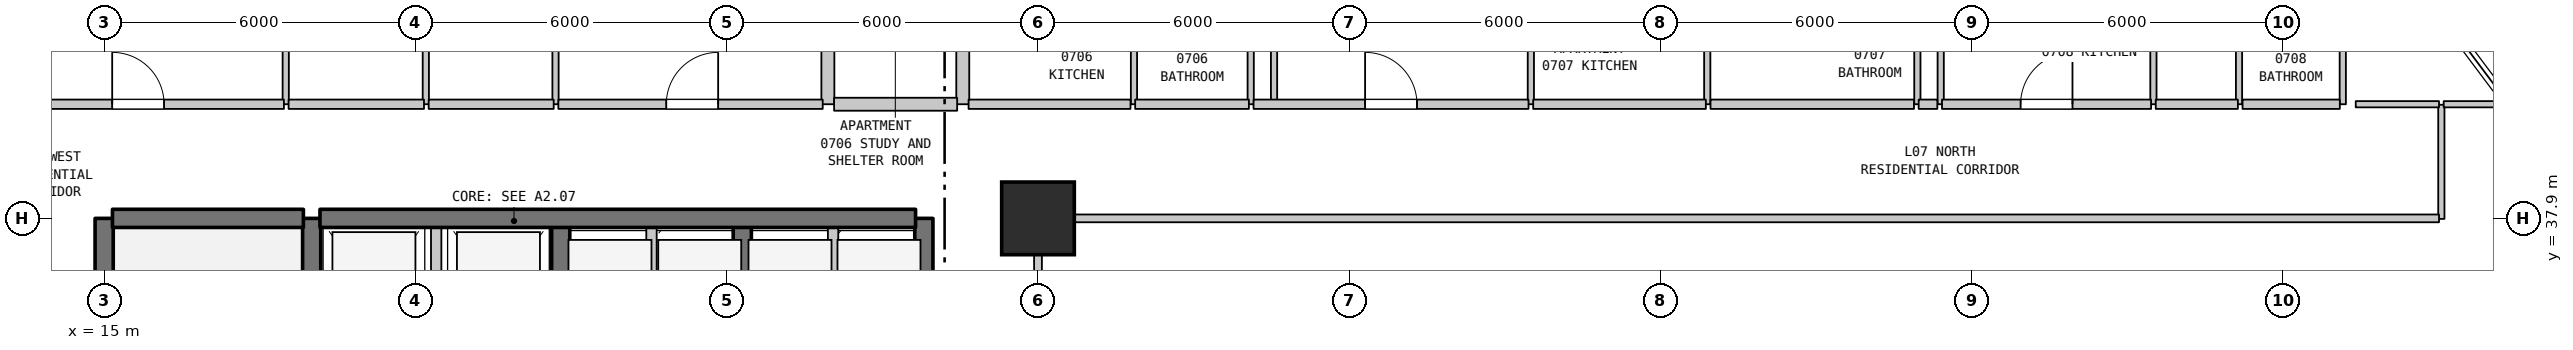
"""IFC4 building model, lengths in metres.
Left out: names, types, materials, properties, quantities, classifications, styles, units other than length and angle.
Written with IfcOpenShell. Run it as: python <this file> out.ifc"""

import sys

from ifc_helpers import new_model, si_unit, direction, frame, frame_2d, origin, origin_2d, place, context, subcontext, project, spatial, rectangle, extrude, element, fill, save


model = new_model("IFC4")
c1 = context("Model", 3, precision=1e-05, world=origin(), true_north=direction((0.0, 1.0)))
c2 = subcontext(c1, "Body", "Model", "MODEL_VIEW")
j1 = project(units=[si_unit("LENGTHUNIT", "METRE"), si_unit("PLANEANGLEUNIT", "RADIAN")], contexts=[c1])
p1 = place(None, origin())
s1 = spatial("IfcSite", under=j1, at=p1, CompositionType="ELEMENT")
p2 = place(p1, origin())
s2 = spatial("IfcBuilding", under=s1, at=p2, CompositionType="ELEMENT")
p3 = place(p2, frame((0.0, 0.0, 35.1)))
s3 = spatial("IfcBuildingStorey", under=s2, at=p3, CompositionType="ELEMENT", Elevation=35.1)
p4 = place(p3, frame((33.0, 37.9, 0.0), z_axis=(0.0, 0.0, 1.0), x_axis=(1.0, 0.0, 0.0)))
e1 = element("IfcColumn", 1, at=p4, inside=s3, PredefinedType="COLUMN", context=c2, shape_type="SweptSolid", body=[
    extrude(rectangle(XDim=1.4, YDim=1.4, at=origin_2d()), origin(), (0.0, 0.0, 1.0), 3.7),
])
p5 = place(p3, frame((15.0, 31.1, 0.0), z_axis=(0.0, 0.0, 1.0), x_axis=(0.0, 1.0, 0.0)))
e2 = element("IfcWall", 2, at=p5, inside=s3, PredefinedType="SHEAR", context=c2, shape_type="SweptSolid", body=[
    extrude(rectangle(XDim=6.8, YDim=0.35, at=frame_2d((3.4, 0.0))), origin(), (0.0, 0.0, 1.0), 3.385),
])
p6 = place(p3, frame((18.5, 40.1, 0.0), z_axis=(0.0, 0.0, 1.0), x_axis=(0.0, 1.0, 0.0)))
e3 = element("IfcWall", 3, at=p6, inside=s3, PredefinedType="PARTITIONING", context=c2, shape_type="SweptSolid", body=[
    extrude(rectangle(XDim=3.2, YDim=0.12, at=frame_2d((1.6, 0.0))), origin(), (0.0, 0.0, 1.0), 3.385),
])
p7 = place(p3, frame((19.0, 35.0, 0.0), z_axis=(0.0, 0.0, 1.0), x_axis=(0.0, 1.0, 0.0)))
e4 = element("IfcWall", 4, at=p7, inside=s3, PredefinedType="SHEAR", context=c2, shape_type="SweptSolid", body=[
    extrude(rectangle(XDim=2.9, YDim=0.35, at=frame_2d((1.45, 0.0))), origin(), (0.0, 0.0, 1.0), 3.385),
])
p8 = place(p3, frame((21.2, 40.1, 0.0), z_axis=(0.0, 0.0, 1.0), x_axis=(0.0, 1.0, 0.0)))
e5 = element("IfcWall", 5, at=p8, inside=s3, PredefinedType="PARTITIONING", context=c2, shape_type="SweptSolid", body=[
    extrude(rectangle(XDim=3.2, YDim=0.12, at=frame_2d((1.6, 0.0))), origin(), (0.0, 0.0, 1.0), 3.385),
])
p9 = place(p8, frame((1.15, 0.0, 0.0)))
e6 = element("IfcOpeningElement", 6, at=p9, cuts=e5, PredefinedType="OPENING", context=c2, shape_type="SweptSolid", body=[
    extrude(rectangle(XDim=0.9, YDim=2.15, at=frame_2d((0.45, 1.075))), frame((0.0, 0.07, 0.0), z_axis=(0.0, -1.0, 0.0), x_axis=(1.0, 0.0, 0.0)), (0.0, 0.0, 1.0), 0.14),
])
p10 = place(p3, frame((21.4, 35.0, 0.0), z_axis=(0.0, 0.0, 1.0), x_axis=(0.0, 1.0, 0.0)))
e7 = element("IfcWall", 7, at=p10, inside=s3, PredefinedType="STANDARD", context=c2, shape_type="SweptSolid", body=[
    extrude(rectangle(XDim=2.9, YDim=0.2, at=frame_2d((1.45, 0.0))), origin(), (0.0, 0.0, 1.0), 3.385),
])
p11 = place(p3, frame((23.7, 40.1, 0.0), z_axis=(0.0, 0.0, 1.0), x_axis=(0.0, 1.0, 0.0)))
e8 = element("IfcWall", 8, at=p11, inside=s3, PredefinedType="PARTITIONING", context=c2, shape_type="SweptSolid", body=[
    extrude(rectangle(XDim=2.05, YDim=0.12, at=frame_2d((1.025, 0.0))), origin(), (0.0, 0.0, 1.0), 3.385),
])
p12 = place(p3, frame((23.8, 35.0, 0.0), z_axis=(0.0, 0.0, 1.0), x_axis=(0.0, 1.0, 0.0)))
e9 = element("IfcWall", 9, at=p12, inside=s3, PredefinedType="SHEAR", context=c2, shape_type="SweptSolid", body=[
    extrude(rectangle(XDim=2.9, YDim=0.35, at=frame_2d((1.45, 0.0))), origin(), (0.0, 0.0, 1.0), 3.385),
])
p13 = place(p3, frame((25.55, 35.0, 0.0), z_axis=(0.0, 0.0, 1.0), x_axis=(0.0, 1.0, 0.0)))
e10 = element("IfcWall", 10, at=p13, inside=s3, PredefinedType="STANDARD", context=c2, shape_type="SweptSolid", body=[
    extrude(rectangle(XDim=2.9, YDim=0.2, at=frame_2d((1.45, 0.0))), origin(), (0.0, 0.0, 1.0), 3.385),
])
p14 = place(p3, frame((27.3, 35.0, 0.0), z_axis=(0.0, 0.0, 1.0), x_axis=(0.0, 1.0, 0.0)))
e11 = element("IfcWall", 11, at=p14, inside=s3, PredefinedType="SHEAR", context=c2, shape_type="SweptSolid", body=[
    extrude(rectangle(XDim=2.9, YDim=0.35, at=frame_2d((1.45, 0.0))), origin(), (0.0, 0.0, 1.0), 3.385),
])
p15 = place(p3, frame((28.95, 40.1, 0.0), z_axis=(0.0, 0.0, 1.0), x_axis=(0.0, 1.0, 0.0)))
e12 = element("IfcWall", 12, at=p15, inside=s3, PredefinedType="STANDARD", context=c2, shape_type="SweptSolid", body=[
    extrude(rectangle(XDim=2.3, YDim=0.25, at=frame_2d((1.15, 0.0))), origin(), (0.0, 0.0, 1.0), 3.385),
])
p16 = place(p3, frame((29.05, 35.0, 0.0), z_axis=(0.0, 0.0, 1.0), x_axis=(0.0, 1.0, 0.0)))
e13 = element("IfcWall", 13, at=p16, inside=s3, PredefinedType="STANDARD", context=c2, shape_type="SweptSolid", body=[
    extrude(rectangle(XDim=2.9, YDim=0.2, at=frame_2d((1.45, 0.0))), origin(), (0.0, 0.0, 1.0), 3.385),
])
p17 = place(p3, frame((30.8, 35.0, 0.0), z_axis=(0.0, 0.0, 1.0), x_axis=(0.0, 1.0, 0.0)))
e14 = element("IfcWall", 14, at=p17, inside=s3, PredefinedType="SHEAR", context=c2, shape_type="SweptSolid", body=[
    extrude(rectangle(XDim=2.9, YDim=0.35, at=frame_2d((1.45, 0.0))), origin(), (0.0, 0.0, 1.0), 3.385),
])
p18 = place(p3, frame((31.55, 40.1, 0.0), z_axis=(0.0, 0.0, 1.0), x_axis=(0.0, 1.0, 0.0)))
e15 = element("IfcWall", 15, at=p18, inside=s3, PredefinedType="STANDARD", context=c2, shape_type="SweptSolid", body=[
    extrude(rectangle(XDim=2.3, YDim=0.25, at=frame_2d((1.15, 0.0))), origin(), (0.0, 0.0, 1.0), 3.385),
])
p19 = place(p3, frame((33.0, 27.91, 0.0), z_axis=(0.0, 0.0, 1.0), x_axis=(0.0, 1.0, 0.0)))
e16 = element("IfcWall", 16, at=p19, inside=s3, PredefinedType="STANDARD", context=c2, shape_type="SweptSolid", body=[
    extrude(rectangle(XDim=9.98, YDim=0.15, at=frame_2d((4.99, 0.0))), origin(), (0.0, 0.0, 1.0), 2.885),
])
for number, where, z_axis, x_axis in (
    (17, (34.85, 40.1, 0.0), (0.0, 0.0, 1.0), (0.0, 1.0, 0.0)),
    (18, (37.1, 40.1, 0.0), (0.0, 0.0, 1.0), (0.0, 1.0, 0.0)),
):
    element("IfcWall", number, at=place(p3, frame(where, z_axis=z_axis, x_axis=x_axis)), inside=s3, PredefinedType="PARTITIONING", context=c2, shape_type="SweptSolid", body=[
        extrude(rectangle(XDim=2.3, YDim=0.12, at=frame_2d((1.15, 0.0))), origin(), (0.0, 0.0, 1.0), 3.385),
    ])
p20 = place(p3, frame((37.55, 40.1, 0.0), z_axis=(0.0, 0.0, 1.0), x_axis=(0.0, 1.0, 0.0)))
e19 = element("IfcWall", 19, at=p20, inside=s3, PredefinedType="PARTITIONING", context=c2, shape_type="SweptSolid", body=[
    extrude(rectangle(XDim=2.05, YDim=0.12, at=frame_2d((1.025, 0.0))), origin(), (0.0, 0.0, 1.0), 3.385),
])
for number, where, z_axis, x_axis in (
    (20, (42.5, 40.1, 0.0), (0.0, 0.0, 1.0), (0.0, 1.0, 0.0)),
    (21, (45.9, 40.1, 0.0), (0.0, 0.0, 1.0), (0.0, 1.0, 0.0)),
    (22, (49.95, 40.1, 0.0), (0.0, 0.0, 1.0), (0.0, 1.0, 0.0)),
):
    element("IfcWall", number, at=place(p3, frame(where, z_axis=z_axis, x_axis=x_axis)), inside=s3, PredefinedType="PARTITIONING", context=c2, shape_type="SweptSolid", body=[
        extrude(rectangle(XDim=2.3, YDim=0.12, at=frame_2d((1.15, 0.0))), origin(), (0.0, 0.0, 1.0), 3.385),
    ])
p21 = place(p3, frame((50.4, 40.1, 0.0), z_axis=(0.0, 0.0, 1.0), x_axis=(0.0, 1.0, 0.0)))
e23 = element("IfcWall", 23, at=p21, inside=s3, PredefinedType="PARTITIONING", context=c2, shape_type="SweptSolid", body=[
    extrude(rectangle(XDim=5.35, YDim=0.12, at=frame_2d((2.675, 0.0))), origin(), (0.0, 0.0, 1.0), 3.385),
])
for number, where, z_axis, x_axis in (
    (24, (54.5, 40.1, 0.0), (0.0, 0.0, 1.0), (0.0, 1.0, 0.0)),
    (25, (56.15, 40.1, 0.0), (0.0, 0.0, 1.0), (0.0, 1.0, 0.0)),
    (26, (58.15, 40.1, 0.0), (0.0, 0.0, 1.0), (0.0, 1.0, 0.0)),
):
    element("IfcWall", number, at=place(p3, frame(where, z_axis=z_axis, x_axis=x_axis)), inside=s3, PredefinedType="PARTITIONING", context=c2, shape_type="SweptSolid", body=[
        extrude(rectangle(XDim=2.3, YDim=0.12, at=frame_2d((1.15, 0.0))), origin(), (0.0, 0.0, 1.0), 3.385),
    ])
p22 = place(p3, frame((60.05, 37.89, 0.0), z_axis=(0.0, 0.0, 1.0), x_axis=(0.0, 1.0, 0.0)))
e27 = element("IfcWall", 27, at=p22, inside=s3, PredefinedType="PARTITIONING", context=c2, shape_type="SweptSolid", body=[
    extrude(rectangle(XDim=2.2, YDim=0.12, at=frame_2d((1.1, 0.0))), origin(), (0.0, 0.0, 1.0), 3.385),
])
p23 = place(p3, frame((15.16, 37.9, 0.0), z_axis=(0.0, 0.0, 1.0), x_axis=(1.0, 0.0, 0.0)))
e28 = element("IfcWall", 28, at=p23, inside=s3, PredefinedType="SHEAR", context=c2, shape_type="SweptSolid", body=[
    extrude(rectangle(XDim=3.68, YDim=0.35, at=frame_2d((1.84, 0.0))), origin(), (0.0, 0.0, 1.0), 3.385),
])
p24 = place(p3, frame((19.16, 37.9, 0.0), z_axis=(0.0, 0.0, 1.0), x_axis=(1.0, 0.0, 0.0)))
e29 = element("IfcWall", 29, at=p24, inside=s3, PredefinedType="SHEAR", context=c2, shape_type="SweptSolid", body=[
    extrude(rectangle(XDim=11.48, YDim=0.35, at=frame_2d((5.74, 0.0))), origin(), (0.0, 0.0, 1.0), 3.385),
])
p25 = place(p3, frame((33.07, 37.9, 0.0), z_axis=(0.0, 0.0, 1.0), x_axis=(1.0, 0.0, 0.0)))
e30 = element("IfcWall", 30, at=p25, inside=s3, PredefinedType="STANDARD", context=c2, shape_type="SweptSolid", body=[
    extrude(rectangle(XDim=26.935, YDim=0.15, at=frame_2d((13.467, 0.0))), origin(), (0.0, 0.0, 1.0), 3.385),
])
p26 = place(p3, frame((12.875, 40.1, 0.0), z_axis=(0.0, 0.0, 1.0), x_axis=(1.0, 0.0, 0.0)))
e31 = element("IfcWall", 31, at=p26, inside=s3, PredefinedType="STANDARD", context=c2, shape_type="SweptSolid", body=[
    extrude(rectangle(XDim=5.59, YDim=0.18, at=frame_2d((2.795, 0.0))), origin(), (0.0, 0.0, 1.0), 3.385),
])
p27 = place(p26, frame((2.28, 0.0, 0.0)))
e32 = element("IfcOpeningElement", 32, at=p27, cuts=e31, PredefinedType="OPENING", context=c2, shape_type="SweptSolid", body=[
    extrude(rectangle(XDim=1.0, YDim=2.15, at=frame_2d((0.5, 1.075))), frame((0.0, 0.1, 0.0), z_axis=(0.0, -1.0, 0.0), x_axis=(1.0, 0.0, 0.0)), (0.0, 0.0, 1.0), 0.2),
])
p28 = place(p3, frame((18.555, 40.1, 0.0), z_axis=(0.0, 0.0, 1.0), x_axis=(1.0, 0.0, 0.0)))
e33 = element("IfcWall", 33, at=p28, inside=s3, PredefinedType="STANDARD", context=c2, shape_type="SweptSolid", body=[
    extrude(rectangle(XDim=2.61, YDim=0.18, at=frame_2d((1.305, 0.0))), origin(), (0.0, 0.0, 1.0), 3.385),
])
p29 = place(p3, frame((21.255, 40.1, 0.0), z_axis=(0.0, 0.0, 1.0), x_axis=(1.0, 0.0, 0.0)))
e34 = element("IfcWall", 34, at=p29, inside=s3, PredefinedType="STANDARD", context=c2, shape_type="SweptSolid", body=[
    extrude(rectangle(XDim=2.41, YDim=0.18, at=frame_2d((1.205, 0.0))), origin(), (0.0, 0.0, 1.0), 3.385),
])
p30 = place(p3, frame((23.755, 40.1, 0.0), z_axis=(0.0, 0.0, 1.0), x_axis=(1.0, 0.0, 0.0)))
e35 = element("IfcWall", 35, at=p30, inside=s3, PredefinedType="STANDARD", context=c2, shape_type="SweptSolid", body=[
    extrude(rectangle(XDim=5.095, YDim=0.18, at=frame_2d((2.548, 0.0))), origin(), (0.0, 0.0, 1.0), 3.385),
])
p31 = place(p30, frame((2.08, 0.0, 0.0)))
e36 = element("IfcOpeningElement", 36, at=p31, cuts=e35, PredefinedType="OPENING", context=c2, shape_type="SweptSolid", body=[
    extrude(rectangle(XDim=1.0, YDim=2.15, at=frame_2d((0.5, 1.075))), frame((0.0, 0.1, 0.0), z_axis=(0.0, -1.0, 0.0), x_axis=(1.0, 0.0, 0.0)), (0.0, 0.0, 1.0), 0.2),
])
p32 = place(p3, frame((29.07, 40.1, 0.0), z_axis=(0.0, 0.0, 1.0), x_axis=(1.0, 0.0, 0.0)))
e37 = element("IfcWall", 37, at=p32, inside=s3, PredefinedType="STANDARD", context=c2, shape_type="SweptSolid", body=[
    extrude(rectangle(XDim=2.372, YDim=0.25, at=frame_2d((1.186, 0.0))), origin(), (0.0, 0.0, 1.0), 3.385),
])
p33 = place(p3, frame((31.662, 40.1, 0.0), z_axis=(0.0, 0.0, 1.0), x_axis=(1.0, 0.0, 0.0)))
e38 = element("IfcWall", 38, at=p33, inside=s3, PredefinedType="STANDARD", context=c2, shape_type="SweptSolid", body=[
    extrude(rectangle(XDim=3.121, YDim=0.18, at=frame_2d((1.561, 0.0))), origin(), (0.0, 0.0, 1.0), 3.385),
])
p34 = place(p3, frame((34.873, 40.1, 0.0), z_axis=(0.0, 0.0, 1.0), x_axis=(1.0, 0.0, 0.0)))
e39 = element("IfcWall", 39, at=p34, inside=s3, PredefinedType="STANDARD", context=c2, shape_type="SweptSolid", body=[
    extrude(rectangle(XDim=2.192, YDim=0.18, at=frame_2d((1.096, 0.0))), origin(), (0.0, 0.0, 1.0), 3.385),
])
p35 = place(p3, frame((37.155, 40.1, 0.0), z_axis=(0.0, 0.0, 1.0), x_axis=(1.0, 0.0, 0.0)))
e40 = element("IfcWall", 40, at=p35, inside=s3, PredefinedType="STANDARD", context=c2, shape_type="SweptSolid", body=[
    extrude(rectangle(XDim=5.3, YDim=0.18, at=frame_2d((2.65, 0.0))), origin(), (0.0, 0.0, 1.0), 3.385),
])
p36 = place(p35, frame((2.15, 0.0, 0.0)))
e41 = element("IfcOpeningElement", 41, at=p36, cuts=e40, PredefinedType="OPENING", context=c2, shape_type="SweptSolid", body=[
    extrude(rectangle(XDim=1.0, YDim=2.15, at=frame_2d((0.5, 1.075))), frame((0.0, 0.1, 0.0), z_axis=(0.0, -1.0, 0.0), x_axis=(1.0, 0.0, 0.0)), (0.0, 0.0, 1.0), 0.2),
])
p37 = place(p3, frame((42.545, 40.1, 0.0), z_axis=(0.0, 0.0, 1.0), x_axis=(1.0, 0.0, 0.0)))
e42 = element("IfcWall", 42, at=p37, inside=s3, PredefinedType="STANDARD", context=c2, shape_type="SweptSolid", body=[
    extrude(rectangle(XDim=3.328, YDim=0.18, at=frame_2d((1.664, 0.0))), origin(), (0.0, 0.0, 1.0), 3.385),
])
p38 = place(p3, frame((45.963, 40.1, 0.0), z_axis=(0.0, 0.0, 1.0), x_axis=(1.0, 0.0, 0.0)))
e43 = element("IfcWall", 43, at=p38, inside=s3, PredefinedType="STANDARD", context=c2, shape_type="SweptSolid", body=[
    extrude(rectangle(XDim=3.922, YDim=0.18, at=frame_2d((1.961, 0.0))), origin(), (0.0, 0.0, 1.0), 3.385),
])
p39 = place(p3, frame((49.975, 40.1, 0.0), z_axis=(0.0, 0.0, 1.0), x_axis=(1.0, 0.0, 0.0)))
e44 = element("IfcWall", 44, at=p39, inside=s3, PredefinedType="STANDARD", context=c2, shape_type="SweptSolid", body=[
    extrude(rectangle(XDim=0.36, YDim=0.18, at=frame_2d((0.18, 0.0))), origin(), (0.0, 0.0, 1.0), 3.385),
])
p40 = place(p3, frame((50.425, 40.1, 0.0), z_axis=(0.0, 0.0, 1.0), x_axis=(1.0, 0.0, 0.0)))
e45 = element("IfcWall", 45, at=p40, inside=s3, PredefinedType="STANDARD", context=c2, shape_type="SweptSolid", body=[
    extrude(rectangle(XDim=4.03, YDim=0.18, at=frame_2d((2.015, 0.0))), origin(), (0.0, 0.0, 1.0), 3.385),
])
p41 = place(p40, frame((1.515, 0.0, 0.0)))
e46 = element("IfcOpeningElement", 46, at=p41, cuts=e45, PredefinedType="OPENING", context=c2, shape_type="SweptSolid", body=[
    extrude(rectangle(XDim=1.0, YDim=2.15, at=frame_2d((0.5, 1.075))), frame((0.0, 0.1, 0.0), z_axis=(0.0, -1.0, 0.0), x_axis=(1.0, 0.0, 0.0)), (0.0, 0.0, 1.0), 0.2),
])
p42 = place(p3, frame((54.545, 40.1, 0.0), z_axis=(0.0, 0.0, 1.0), x_axis=(1.0, 0.0, 0.0)))
e47 = element("IfcWall", 47, at=p42, inside=s3, PredefinedType="STANDARD", context=c2, shape_type="SweptSolid", body=[
    extrude(rectangle(XDim=1.583, YDim=0.18, at=frame_2d((0.792, 0.0))), origin(), (0.0, 0.0, 1.0), 3.385),
])
p43 = place(p3, frame((56.218, 40.1, 0.0), z_axis=(0.0, 0.0, 1.0), x_axis=(1.0, 0.0, 0.0)))
e48 = element("IfcWall", 48, at=p43, inside=s3, PredefinedType="STANDARD", context=c2, shape_type="SweptSolid", body=[
    extrude(rectangle(XDim=1.875, YDim=0.18, at=frame_2d((0.938, 0.0))), origin(), (0.0, 0.0, 1.0), 3.385),
])
p44 = place(p3, frame((58.4, 40.1, 0.0), z_axis=(0.0, 0.0, 1.0), x_axis=(1.0, 0.0, 0.0)))
e49 = element("IfcWall", 49, at=p44, inside=s3, PredefinedType="PARTITIONING", context=c2, shape_type="SweptSolid", body=[
    extrude(rectangle(XDim=1.605, YDim=0.12, at=frame_2d((0.802, 0.0))), origin(), (0.0, 0.0, 1.0), 3.385),
])
p45 = place(p3, frame((60.095, 40.1, 0.0), z_axis=(0.0, 0.0, 1.0), x_axis=(1.0, 0.0, 0.0)))
e50 = element("IfcWall", 50, at=p45, inside=s3, PredefinedType="PARTITIONING", context=c2, shape_type="SweptSolid", body=[
    extrude(rectangle(XDim=1.245, YDim=0.12, at=frame_2d((0.623, 0.0))), origin(), (0.0, 0.0, 1.0), 3.385),
])
p46 = place(p27, origin())
e51 = element("IfcDoor", 51, at=p46, inside=s3, OperationType="SINGLE_SWING_LEFT", PredefinedType="DOOR", context=c2, shape_type="SweptSolid", body=[
    extrude(rectangle(XDim=1.0, YDim=2.15, at=frame_2d((0.5, 1.075))), frame((0.0, 0.025, 0.0), z_axis=(0.0, -1.0, 0.0), x_axis=(1.0, 0.0, 0.0)), (0.0, 0.0, 1.0), 0.05),
])
fill(e32, e51)
p47 = place(p31, origin())
e52 = element("IfcDoor", 52, at=p47, inside=s3, OperationType="SINGLE_SWING_RIGHT", PredefinedType="DOOR", context=c2, shape_type="SweptSolid", body=[
    extrude(rectangle(XDim=1.0, YDim=2.15, at=frame_2d((0.5, 1.075))), frame((0.0, 0.025, 0.0), z_axis=(0.0, -1.0, 0.0), x_axis=(1.0, 0.0, 0.0)), (0.0, 0.0, 1.0), 0.05),
])
fill(e36, e52)
p48 = place(p36, origin())
e53 = element("IfcDoor", 53, at=p48, inside=s3, OperationType="SINGLE_SWING_LEFT", PredefinedType="DOOR", context=c2, shape_type="SweptSolid", body=[
    extrude(rectangle(XDim=1.0, YDim=2.15, at=frame_2d((0.5, 1.075))), frame((0.0, 0.025, 0.0), z_axis=(0.0, -1.0, 0.0), x_axis=(1.0, 0.0, 0.0)), (0.0, 0.0, 1.0), 0.05),
])
fill(e41, e53)
p49 = place(p41, origin())
e54 = element("IfcDoor", 54, at=p49, inside=s3, OperationType="SINGLE_SWING_RIGHT", PredefinedType="DOOR", context=c2, shape_type="SweptSolid", body=[
    extrude(rectangle(XDim=1.0, YDim=2.15, at=frame_2d((0.5, 1.075))), frame((0.0, 0.025, 0.0), z_axis=(0.0, -1.0, 0.0), x_axis=(1.0, 0.0, 0.0)), (0.0, 0.0, 1.0), 0.05),
])
fill(e46, e54)
save(model, sys.argv[1])
